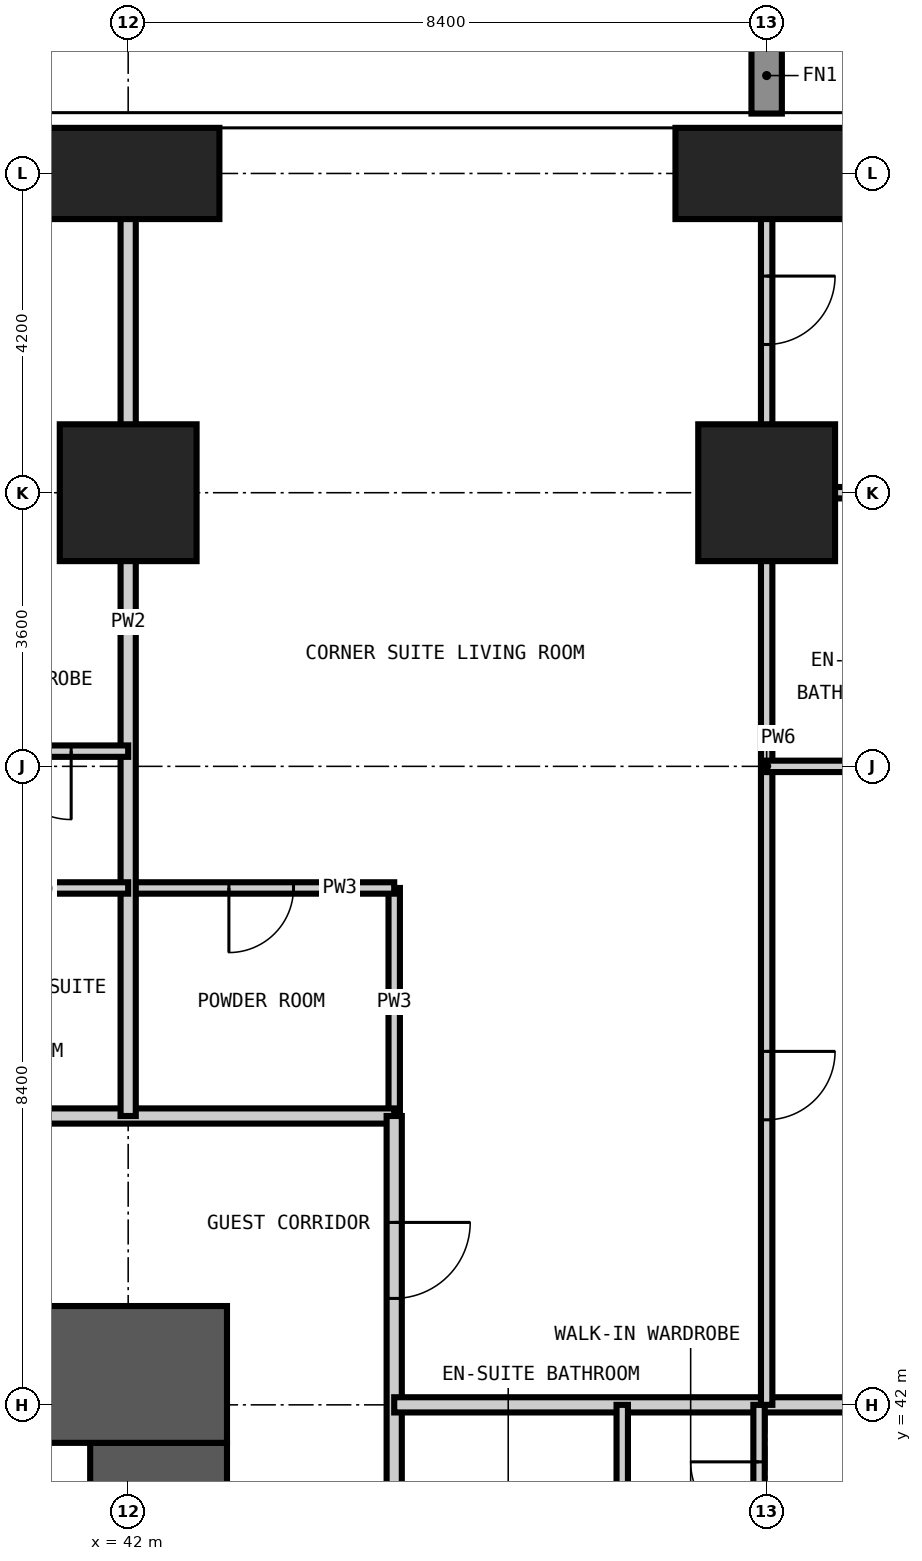
"""IFC4 building model, lengths in metres.
Left out: names, types, materials, properties, quantities, classifications, styles, units other than length and angle.
Written with IfcOpenShell. Run it as: python <this file> out.ifc"""

import sys

from ifc_helpers import new_model, si_unit, direction, frame, frame_2d, origin, origin_2d, place, context, subcontext, project, spatial, rectangle, extrude, element, fill, save


model = new_model("IFC4")
c1 = context("Model", 3, precision=1e-05, world=origin(), true_north=direction((0.0, 1.0)))
c2 = subcontext(c1, "Body", "Model", "MODEL_VIEW")
j1 = project(units=[si_unit("LENGTHUNIT", "METRE"), si_unit("PLANEANGLEUNIT", "RADIAN")], contexts=[c1])
p1 = place(None, origin())
s1 = spatial("IfcSite", under=j1, at=p1, CompositionType="ELEMENT")
p2 = place(p1, origin())
s2 = spatial("IfcBuilding", under=s1, at=p2, CompositionType="ELEMENT")
p3 = place(p2, frame((0.0, 0.0, 30.6)))
s3 = spatial("IfcBuildingStorey", under=s2, at=p3, CompositionType="ELEMENT", Elevation=30.6)
p4 = place(p3, frame((42.0, 54.0, -0.35), z_axis=(0.0, 0.0, 1.0), x_axis=(1.0, 0.0, 0.0)))
e1 = element("IfcColumn", 1, at=p4, inside=s3, PredefinedType="COLUMN", context=c2, shape_type="SweptSolid", body=[
    extrude(rectangle(XDim=1.8, YDim=1.8, at=origin_2d()), origin(), (0.0, 0.0, 1.0), 3.6),
])
p5 = place(p3, frame((42.0, 58.2, -0.35), z_axis=(0.0, 0.0, 1.0), x_axis=(1.0, 0.0, 0.0)))
e2 = element("IfcColumn", 2, at=p5, inside=s3, PredefinedType="COLUMN", context=c2, shape_type="SweptSolid", body=[
    extrude(rectangle(XDim=2.4, YDim=1.2, at=origin_2d()), origin(), (0.0, 0.0, 1.0), 3.6),
])
p6 = place(p3, frame((50.4, 54.0, -0.35), z_axis=(0.0, 0.0, 1.0), x_axis=(1.0, 0.0, 0.0)))
e3 = element("IfcColumn", 3, at=p6, inside=s3, PredefinedType="COLUMN", context=c2, shape_type="SweptSolid", body=[
    extrude(rectangle(XDim=1.8, YDim=1.8, at=origin_2d()), origin(), (0.0, 0.0, 1.0), 3.6),
])
p7 = place(p3, frame((50.4, 58.2, -0.35), z_axis=(0.0, 0.0, 1.0), x_axis=(1.0, 0.0, 0.0)))
e4 = element("IfcColumn", 4, at=p7, inside=s3, PredefinedType="COLUMN", context=c2, shape_type="SweptSolid", body=[
    extrude(rectangle(XDim=2.4, YDim=1.2, at=origin_2d()), origin(), (0.0, 0.0, 1.0), 3.6),
])
p8 = place(p3, frame((42.4, 17.3, -0.35), z_axis=(0.0, 0.0, 1.0), x_axis=(0.0, 1.0, 0.0)))
e5 = element("IfcWall", 5, at=p8, inside=s3, PredefinedType="SHEAR", context=c2, shape_type="SweptSolid", body=[
    extrude(rectangle(XDim=24.2, YDim=1.8, at=frame_2d((12.1, 0.0))), origin(), (0.0, 0.0, 1.0), 3.6),
])
p9 = place(p8, frame((0.3, 0.0, 0.35)))
e6 = element("IfcOpeningElement", 6, at=p9, cuts=e5, PredefinedType="OPENING", context=c2, shape_type="SweptSolid", body=[
    extrude(rectangle(XDim=1.2, YDim=2.2, at=frame_2d((0.6, 1.1))), frame((0.0, 0.91, 0.0), z_axis=(0.0, -1.0, 0.0), x_axis=(1.0, 0.0, 0.0)), (0.0, 0.0, 1.0), 1.82),
])
p10 = place(p8, frame((11.6, 0.0, 0.35)))
e7 = element("IfcOpeningElement", 7, at=p10, cuts=e5, PredefinedType="OPENING", context=c2, shape_type="SweptSolid", body=[
    extrude(rectangle(XDim=1.0, YDim=2.1, at=frame_2d((0.5, 1.05))), frame((0.0, 0.91, 0.0), z_axis=(0.0, -1.0, 0.0), x_axis=(1.0, 0.0, 0.0)), (0.0, 0.0, 1.0), 1.82),
])
p11 = place(p8, frame((20.0, 0.0, 0.35)))
e8 = element("IfcOpeningElement", 8, at=p11, cuts=e5, PredefinedType="OPENING", context=c2, shape_type="SweptSolid", body=[
    extrude(rectangle(XDim=1.0, YDim=2.1, at=frame_2d((0.5, 1.05))), frame((0.0, 0.91, 0.0), z_axis=(0.0, -1.0, 0.0), x_axis=(1.0, 0.0, 0.0)), (0.0, 0.0, 1.0), 1.82),
])
p12 = place(p3, frame((43.3, 42.4, -0.35), z_axis=(0.0, 0.0, 1.0), x_axis=(-1.0, 0.0, 0.0)))
e9 = element("IfcWall", 9, at=p12, inside=s3, PredefinedType="SHEAR", context=c2, shape_type="SweptSolid", body=[
    extrude(rectangle(XDim=27.8, YDim=1.8, at=frame_2d((13.9, 0.0))), origin(), (0.0, 0.0, 1.0), 3.6),
])
p13 = place(p12, frame((21.8, 0.0, 0.35)))
e10 = element("IfcOpeningElement", 10, at=p13, cuts=e9, PredefinedType="OPENING", context=c2, shape_type="SweptSolid", body=[
    extrude(rectangle(XDim=1.0, YDim=2.1, at=frame_2d((0.5, 1.05))), frame((0.0, 0.91, 0.0), z_axis=(0.0, -1.0, 0.0), x_axis=(1.0, 0.0, 0.0)), (0.0, 0.0, 1.0), 1.82),
])
p14 = place(p12, frame((11.2, 0.0, 0.35)))
e11 = element("IfcOpeningElement", 11, at=p14, cuts=e9, PredefinedType="OPENING", context=c2, shape_type="SweptSolid", body=[
    extrude(rectangle(XDim=1.2, YDim=2.2, at=frame_2d((0.6, 1.1))), frame((0.0, 0.91, 0.0), z_axis=(0.0, -1.0, 0.0), x_axis=(1.0, 0.0, 0.0)), (0.0, 0.0, 1.0), 1.82),
])
p15 = place(p3, frame((45.5, 45.8, 0.0), z_axis=(0.0, 0.0, 1.0), x_axis=(0.0, 1.0, 0.0)))
e12 = element("IfcWall", 12, at=p15, inside=s3, PredefinedType="PARTITIONING", context=c2, shape_type="SweptSolid", body=[
    extrude(rectangle(XDim=3.0, YDim=0.15, at=frame_2d((1.5, 0.0))), origin(), (0.0, 0.0, 1.0), 3.25),
])
p16 = place(p3, frame((42.0, 48.8, 0.0), z_axis=(0.0, 0.0, 1.0), x_axis=(1.0, 0.0, 0.0)))
e13 = element("IfcWall", 13, at=p16, inside=s3, PredefinedType="PARTITIONING", context=c2, shape_type="SweptSolid", body=[
    extrude(rectangle(XDim=3.5, YDim=0.15, at=frame_2d((1.75, 0.0))), origin(), (0.0, 0.0, 1.0), 3.25),
])
p17 = place(p16, frame((1.325, 0.0, 0.0)))
e14 = element("IfcOpeningElement", 14, at=p17, cuts=e13, PredefinedType="OPENING", context=c2, shape_type="SweptSolid", body=[
    extrude(rectangle(XDim=0.85, YDim=2.1, at=frame_2d((0.425, 1.05))), frame((0.0, 0.085, 0.0), z_axis=(0.0, -1.0, 0.0), x_axis=(1.0, 0.0, 0.0)), (0.0, 0.0, 1.0), 0.17),
])
p18 = place(p3, frame((50.4, 54.0, 0.0), z_axis=(0.0, 0.0, 1.0), x_axis=(1.0, 0.0, 0.0)))
e15 = element("IfcWall", 15, at=p18, inside=s3, PredefinedType="PARTITIONING", context=c2, shape_type="SweptSolid", body=[
    extrude(rectangle(XDim=3.0, YDim=0.15, at=frame_2d((1.5, 0.0))), origin(), (0.0, 0.0, 1.0), 3.25),
])
p19 = place(p3, frame((13.6, 45.8, 0.0), z_axis=(0.0, 0.0, 1.0), x_axis=(1.0, 0.0, 0.0)))
e16 = element("IfcWall", 16, at=p19, inside=s3, PredefinedType="PARTITIONING", context=c2, shape_type="SweptSolid", body=[
    extrude(rectangle(XDim=31.9, YDim=0.2, at=frame_2d((15.95, 0.0))), origin(), (0.0, 0.0, 1.0), 3.25),
])
p20 = place(p19, frame((6.0, 0.0, 0.0)))
e17 = element("IfcOpeningElement", 17, at=p20, cuts=e16, PredefinedType="OPENING", context=c2, shape_type="SweptSolid", body=[
    extrude(rectangle(XDim=1.0, YDim=2.2, at=frame_2d((0.5, 1.1))), frame((0.0, 0.11, 0.0), z_axis=(0.0, -1.0, 0.0), x_axis=(1.0, 0.0, 0.0)), (0.0, 0.0, 1.0), 0.22),
])
p21 = place(p19, frame((7.8, 0.0, 0.0)))
e18 = element("IfcOpeningElement", 18, at=p21, cuts=e16, PredefinedType="OPENING", context=c2, shape_type="SweptSolid", body=[
    extrude(rectangle(XDim=1.0, YDim=2.2, at=frame_2d((0.5, 1.1))), frame((0.0, 0.11, 0.0), z_axis=(0.0, -1.0, 0.0), x_axis=(1.0, 0.0, 0.0)), (0.0, 0.0, 1.0), 0.22),
])
p22 = place(p19, frame((14.4, 0.0, 0.0)))
e19 = element("IfcOpeningElement", 19, at=p22, cuts=e16, PredefinedType="OPENING", context=c2, shape_type="SweptSolid", body=[
    extrude(rectangle(XDim=1.0, YDim=2.2, at=frame_2d((0.5, 1.1))), frame((0.0, 0.11, 0.0), z_axis=(0.0, -1.0, 0.0), x_axis=(1.0, 0.0, 0.0)), (0.0, 0.0, 1.0), 0.22),
])
p23 = place(p19, frame((16.2, 0.0, 0.0)))
e20 = element("IfcOpeningElement", 20, at=p23, cuts=e16, PredefinedType="OPENING", context=c2, shape_type="SweptSolid", body=[
    extrude(rectangle(XDim=1.0, YDim=2.2, at=frame_2d((0.5, 1.1))), frame((0.0, 0.11, 0.0), z_axis=(0.0, -1.0, 0.0), x_axis=(1.0, 0.0, 0.0)), (0.0, 0.0, 1.0), 0.22),
])
p24 = place(p19, frame((22.8, 0.0, 0.0)))
e21 = element("IfcOpeningElement", 21, at=p24, cuts=e16, PredefinedType="OPENING", context=c2, shape_type="SweptSolid", body=[
    extrude(rectangle(XDim=1.0, YDim=2.2, at=frame_2d((0.5, 1.1))), frame((0.0, 0.11, 0.0), z_axis=(0.0, -1.0, 0.0), x_axis=(1.0, 0.0, 0.0)), (0.0, 0.0, 1.0), 0.22),
])
p25 = place(p19, frame((24.6, 0.0, 0.0)))
e22 = element("IfcOpeningElement", 22, at=p25, cuts=e16, PredefinedType="OPENING", context=c2, shape_type="SweptSolid", body=[
    extrude(rectangle(XDim=1.0, YDim=2.2, at=frame_2d((0.5, 1.1))), frame((0.0, 0.11, 0.0), z_axis=(0.0, -1.0, 0.0), x_axis=(1.0, 0.0, 0.0)), (0.0, 0.0, 1.0), 0.22),
])
p26 = place(p3, frame((45.5, 45.8, 0.0), z_axis=(0.0, 0.0, 1.0), x_axis=(0.0, -1.0, 0.0)))
e23 = element("IfcWall", 23, at=p26, inside=s3, PredefinedType="PARTITIONING", context=c2, shape_type="SweptSolid", body=[
    extrude(rectangle(XDim=32.2, YDim=0.2, at=frame_2d((16.1, 0.0))), origin(), (0.0, 0.0, 1.0), 3.25),
])
p27 = place(p26, frame((26.4, 0.0, 0.0)))
e24 = element("IfcOpeningElement", 24, at=p27, cuts=e23, PredefinedType="OPENING", context=c2, shape_type="SweptSolid", body=[
    extrude(rectangle(XDim=1.0, YDim=2.2, at=frame_2d((0.5, 1.1))), frame((0.0, 0.11, 0.0), z_axis=(0.0, -1.0, 0.0), x_axis=(1.0, 0.0, 0.0)), (0.0, 0.0, 1.0), 0.22),
])
p28 = place(p26, frame((22.2, 0.0, 0.0)))
e25 = element("IfcOpeningElement", 25, at=p28, cuts=e23, PredefinedType="OPENING", context=c2, shape_type="SweptSolid", body=[
    extrude(rectangle(XDim=1.0, YDim=2.2, at=frame_2d((0.5, 1.1))), frame((0.0, 0.11, 0.0), z_axis=(0.0, -1.0, 0.0), x_axis=(1.0, 0.0, 0.0)), (0.0, 0.0, 1.0), 0.22),
])
p29 = place(p26, frame((16.8, 0.0, 0.0)))
e26 = element("IfcOpeningElement", 26, at=p29, cuts=e23, PredefinedType="OPENING", context=c2, shape_type="SweptSolid", body=[
    extrude(rectangle(XDim=1.0, YDim=2.2, at=frame_2d((0.5, 1.1))), frame((0.0, 0.11, 0.0), z_axis=(0.0, -1.0, 0.0), x_axis=(1.0, 0.0, 0.0)), (0.0, 0.0, 1.0), 0.22),
])
p30 = place(p26, frame((15.0, 0.0, 0.0)))
e27 = element("IfcOpeningElement", 27, at=p30, cuts=e23, PredefinedType="OPENING", context=c2, shape_type="SweptSolid", body=[
    extrude(rectangle(XDim=1.0, YDim=2.2, at=frame_2d((0.5, 1.1))), frame((0.0, 0.11, 0.0), z_axis=(0.0, -1.0, 0.0), x_axis=(1.0, 0.0, 0.0)), (0.0, 0.0, 1.0), 0.22),
])
p31 = place(p26, frame((8.4, 0.0, 0.0)))
e28 = element("IfcOpeningElement", 28, at=p31, cuts=e23, PredefinedType="OPENING", context=c2, shape_type="SweptSolid", body=[
    extrude(rectangle(XDim=1.0, YDim=2.2, at=frame_2d((0.5, 1.1))), frame((0.0, 0.11, 0.0), z_axis=(0.0, -1.0, 0.0), x_axis=(1.0, 0.0, 0.0)), (0.0, 0.0, 1.0), 0.22),
])
p32 = place(p26, frame((6.6, 0.0, 0.0)))
e29 = element("IfcOpeningElement", 29, at=p32, cuts=e23, PredefinedType="OPENING", context=c2, shape_type="SweptSolid", body=[
    extrude(rectangle(XDim=1.0, YDim=2.2, at=frame_2d((0.5, 1.1))), frame((0.0, 0.11, 0.0), z_axis=(0.0, -1.0, 0.0), x_axis=(1.0, 0.0, 0.0)), (0.0, 0.0, 1.0), 0.22),
])
p33 = place(p26, frame((30.1, 0.0, 0.0)))
e30 = element("IfcOpeningElement", 30, at=p33, cuts=e23, PredefinedType="OPENING", context=c2, shape_type="SweptSolid", body=[
    extrude(rectangle(XDim=1.0, YDim=2.2, at=frame_2d((0.5, 1.1))), frame((0.0, 0.11, 0.0), z_axis=(0.0, -1.0, 0.0), x_axis=(1.0, 0.0, 0.0)), (0.0, 0.0, 1.0), 0.22),
])
p34 = place(p26, frame((1.4, 0.0, 0.0)))
e31 = element("IfcOpeningElement", 31, at=p34, cuts=e23, PredefinedType="OPENING", context=c2, shape_type="SweptSolid", body=[
    extrude(rectangle(XDim=1.0, YDim=2.2, at=frame_2d((0.5, 1.1))), frame((0.0, 0.11, 0.0), z_axis=(0.0, -1.0, 0.0), x_axis=(1.0, 0.0, 0.0)), (0.0, 0.0, 1.0), 0.22),
])
p35 = place(p3, frame((42.0, 45.8, 0.0), z_axis=(0.0, 0.0, 1.0), x_axis=(0.0, 1.0, 0.0)))
e32 = element("IfcWall", 32, at=p35, inside=s3, PredefinedType="PARTITIONING", context=c2, shape_type="SweptSolid", body=[
    extrude(rectangle(XDim=13.008, YDim=0.2, at=frame_2d((6.504, 0.0))), origin(), (0.0, 0.0, 1.0), 3.25),
])
p36 = place(p3, frame((45.5, 42.0, 0.0), z_axis=(0.0, 0.0, 1.0), x_axis=(1.0, 0.0, 0.0)))
e33 = element("IfcWall", 33, at=p36, inside=s3, PredefinedType="PARTITIONING", context=c2, shape_type="SweptSolid", body=[
    extrude(rectangle(XDim=13.308, YDim=0.2, at=frame_2d((6.654, 0.0))), origin(), (0.0, 0.0, 1.0), 3.25),
])
p37 = place(p3, frame((48.5, 39.6, 0.0), z_axis=(0.0, 0.0, 1.0), x_axis=(0.0, 1.0, 0.0)))
e34 = element("IfcWall", 34, at=p37, inside=s3, PredefinedType="PARTITIONING", context=c2, shape_type="SweptSolid", body=[
    extrude(rectangle(XDim=2.4, YDim=0.15, at=frame_2d((1.2, 0.0))), origin(), (0.0, 0.0, 1.0), 3.25),
])
p38 = place(p3, frame((50.3, 39.6, 0.0), z_axis=(0.0, 0.0, 1.0), x_axis=(0.0, 1.0, 0.0)))
e35 = element("IfcWall", 35, at=p38, inside=s3, PredefinedType="PARTITIONING", context=c2, shape_type="SweptSolid", body=[
    extrude(rectangle(XDim=2.4, YDim=0.15, at=frame_2d((1.2, 0.0))), origin(), (0.0, 0.0, 1.0), 3.25),
])
p39 = place(p38, frame((0.75, 0.0, 0.0)))
e36 = element("IfcOpeningElement", 36, at=p39, cuts=e35, PredefinedType="OPENING", context=c2, shape_type="SweptSolid", body=[
    extrude(rectangle(XDim=0.9, YDim=2.1, at=frame_2d((0.45, 1.05))), frame((0.0, 0.085, 0.0), z_axis=(0.0, -1.0, 0.0), x_axis=(1.0, 0.0, 0.0)), (0.0, 0.0, 1.0), 0.17),
])
p40 = place(p3, frame((50.4, 42.0, 0.0), z_axis=(0.0, 0.0, 1.0), x_axis=(0.0, 1.0, 0.0)))
e37 = element("IfcWall", 37, at=p40, inside=s3, PredefinedType="PARTITIONING", context=c2, shape_type="SweptSolid", body=[
    extrude(rectangle(XDim=16.808, YDim=0.15, at=frame_2d((8.404, 0.0))), origin(), (0.0, 0.0, 1.0), 3.25),
])
p41 = place(p40, frame((13.95, 0.0, 0.0)))
e38 = element("IfcOpeningElement", 38, at=p41, cuts=e37, PredefinedType="OPENING", context=c2, shape_type="SweptSolid", body=[
    extrude(rectangle(XDim=0.9, YDim=2.1, at=frame_2d((0.45, 1.05))), frame((0.0, 0.085, 0.0), z_axis=(0.0, -1.0, 0.0), x_axis=(1.0, 0.0, 0.0)), (0.0, 0.0, 1.0), 0.17),
])
p42 = place(p40, frame((3.75, 0.0, 0.0)))
e39 = element("IfcOpeningElement", 39, at=p42, cuts=e37, PredefinedType="OPENING", context=c2, shape_type="SweptSolid", body=[
    extrude(rectangle(XDim=0.9, YDim=2.1, at=frame_2d((0.45, 1.05))), frame((0.0, 0.085, 0.0), z_axis=(0.0, -1.0, 0.0), x_axis=(1.0, 0.0, 0.0)), (0.0, 0.0, 1.0), 0.17),
])
p43 = place(p3, frame((39.6, 48.8, 0.0), z_axis=(0.0, 0.0, 1.0), x_axis=(1.0, 0.0, 0.0)))
e40 = element("IfcWall", 40, at=p43, inside=s3, PredefinedType="PARTITIONING", context=c2, shape_type="SweptSolid", body=[
    extrude(rectangle(XDim=2.4, YDim=0.15, at=frame_2d((1.2, 0.0))), origin(), (0.0, 0.0, 1.0), 3.25),
])
p44 = place(p3, frame((50.4, 50.4, 0.0), z_axis=(0.0, 0.0, 1.0), x_axis=(1.0, 0.0, 0.0)))
e41 = element("IfcWall", 41, at=p44, inside=s3, PredefinedType="PARTITIONING", context=c2, shape_type="SweptSolid", body=[
    extrude(rectangle(XDim=8.408, YDim=0.15, at=frame_2d((4.204, 0.0))), origin(), (0.0, 0.0, 1.0), 3.25),
])
p45 = place(p44, frame((4.55, 0.0, 0.0)))
e42 = element("IfcOpeningElement", 42, at=p45, cuts=e41, PredefinedType="OPENING", context=c2, shape_type="SweptSolid", body=[
    extrude(rectangle(XDim=0.9, YDim=2.1, at=frame_2d((0.45, 1.05))), frame((0.0, 0.085, 0.0), z_axis=(0.0, -1.0, 0.0), x_axis=(1.0, 0.0, 0.0)), (0.0, 0.0, 1.0), 0.17),
])
p46 = place(p3, frame((39.6, 50.6, 0.0), z_axis=(0.0, 0.0, 1.0), x_axis=(1.0, 0.0, 0.0)))
e43 = element("IfcWall", 43, at=p46, inside=s3, PredefinedType="PARTITIONING", context=c2, shape_type="SweptSolid", body=[
    extrude(rectangle(XDim=2.4, YDim=0.15, at=frame_2d((1.2, 0.0))), origin(), (0.0, 0.0, 1.0), 3.25),
])
p47 = place(p46, frame((0.75, 0.0, 0.0)))
e44 = element("IfcOpeningElement", 44, at=p47, cuts=e43, PredefinedType="OPENING", context=c2, shape_type="SweptSolid", body=[
    extrude(rectangle(XDim=0.9, YDim=2.1, at=frame_2d((0.45, 1.05))), frame((0.0, 0.085, 0.0), z_axis=(0.0, -1.0, 0.0), x_axis=(1.0, 0.0, 0.0)), (0.0, 0.0, 1.0), 0.17),
])
p48 = place(p39, origin())
e45 = element("IfcDoor", 45, at=p48, inside=s3, OperationType="SINGLE_SWING_RIGHT", PredefinedType="DOOR", context=c2, shape_type="SweptSolid", body=[
    extrude(rectangle(XDim=0.9, YDim=2.1, at=frame_2d((0.45, 1.05))), frame((0.0, 0.025, 0.0), z_axis=(0.0, -1.0, 0.0), x_axis=(1.0, 0.0, 0.0)), (0.0, 0.0, 1.0), 0.05),
])
fill(e36, e45)
p49 = place(p47, frame((0.9, 0.0, 0.0), z_axis=(0.0, 0.0, 1.0), x_axis=(-1.0, 0.0, 0.0)))
e46 = element("IfcDoor", 46, at=p49, inside=s3, OperationType="SINGLE_SWING_LEFT", PredefinedType="DOOR", context=c2, shape_type="SweptSolid", body=[
    extrude(rectangle(XDim=0.9, YDim=2.1, at=frame_2d((0.45, 1.05))), frame((0.0, 0.025, 0.0), z_axis=(0.0, -1.0, 0.0), x_axis=(1.0, 0.0, 0.0)), (0.0, 0.0, 1.0), 0.05),
])
fill(e44, e46)
p50 = place(p34, origin())
e47 = element("IfcDoor", 47, at=p50, inside=s3, OperationType="SINGLE_SWING_LEFT", PredefinedType="DOOR", context=c2, shape_type="SweptSolid", body=[
    extrude(rectangle(XDim=1.0, YDim=2.2, at=frame_2d((0.5, 1.1))), frame((0.0, 0.025, 0.0), z_axis=(0.0, -1.0, 0.0), x_axis=(1.0, 0.0, 0.0)), (0.0, 0.0, 1.0), 0.05),
])
fill(e31, e47)
p51 = place(p17, frame((0.85, 0.0, 0.0), z_axis=(0.0, 0.0, 1.0), x_axis=(-1.0, 0.0, 0.0)))
e48 = element("IfcDoor", 48, at=p51, inside=s3, OperationType="SINGLE_SWING_RIGHT", PredefinedType="DOOR", context=c2, shape_type="SweptSolid", body=[
    extrude(rectangle(XDim=0.85, YDim=2.1, at=frame_2d((0.425, 1.05))), frame((0.0, 0.025, 0.0), z_axis=(0.0, -1.0, 0.0), x_axis=(1.0, 0.0, 0.0)), (0.0, 0.0, 1.0), 0.05),
])
fill(e14, e48)
p52 = place(p41, frame((0.9, 0.0, 0.0), z_axis=(0.0, 0.0, 1.0), x_axis=(-1.0, 0.0, 0.0)))
e49 = element("IfcDoor", 49, at=p52, inside=s3, OperationType="SINGLE_SWING_LEFT", PredefinedType="DOOR", context=c2, shape_type="SweptSolid", body=[
    extrude(rectangle(XDim=0.9, YDim=2.1, at=frame_2d((0.45, 1.05))), frame((0.0, 0.025, 0.0), z_axis=(0.0, -1.0, 0.0), x_axis=(1.0, 0.0, 0.0)), (0.0, 0.0, 1.0), 0.05),
])
fill(e38, e49)
p53 = place(p42, frame((0.9, 0.0, 0.0), z_axis=(0.0, 0.0, 1.0), x_axis=(-1.0, 0.0, 0.0)))
e50 = element("IfcDoor", 50, at=p53, inside=s3, OperationType="SINGLE_SWING_LEFT", PredefinedType="DOOR", context=c2, shape_type="SweptSolid", body=[
    extrude(rectangle(XDim=0.9, YDim=2.1, at=frame_2d((0.45, 1.05))), frame((0.0, 0.025, 0.0), z_axis=(0.0, -1.0, 0.0), x_axis=(1.0, 0.0, 0.0)), (0.0, 0.0, 1.0), 0.05),
])
fill(e39, e50)
save(model, sys.argv[1])
